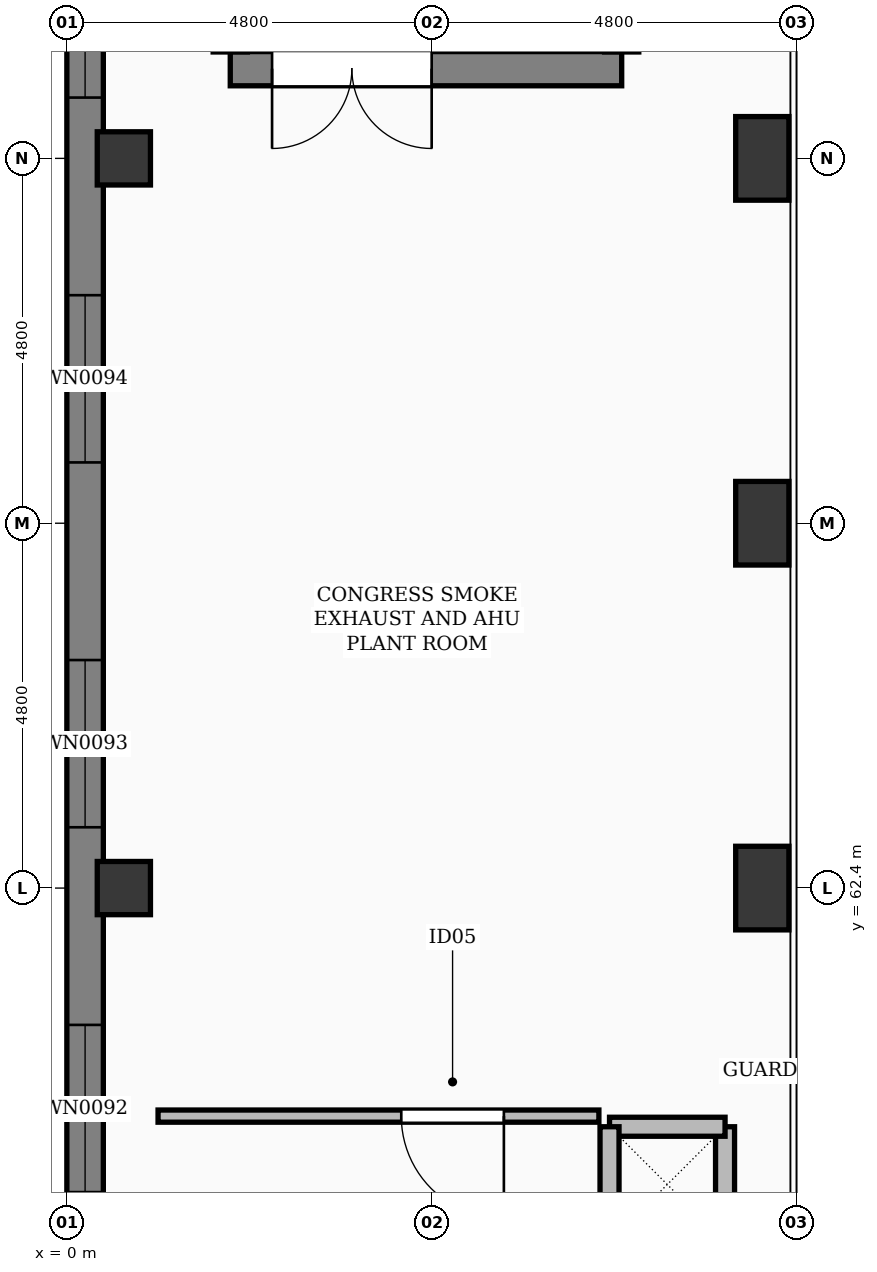
"""IFC4 building model, lengths in metres.
Left out: names, types, materials, properties, quantities, classifications, styles, units other than length and angle.
Written with IfcOpenShell. Run it as: python <this file> out.ifc"""

import sys

from ifc_helpers import new_model, si_unit, direction, frame, frame_2d, origin, origin_2d, place, context, subcontext, project, spatial, rectangle, extrude, element, fill, save


model = new_model("IFC4")
c1 = context("Model", 3, precision=1e-05, world=origin(), true_north=direction((0.0, 1.0)))
c2 = subcontext(c1, "Body", "Model", "MODEL_VIEW")
j1 = project(units=[si_unit("LENGTHUNIT", "METRE"), si_unit("PLANEANGLEUNIT", "RADIAN")], contexts=[c1])
p1 = place(None, origin())
s1 = spatial("IfcSite", under=j1, at=p1, CompositionType="ELEMENT")
p2 = place(p1, origin())
s2 = spatial("IfcBuilding", under=s1, at=p2, CompositionType="ELEMENT")
p3 = place(p2, frame((0.0, 0.0, 16.2)))
s3 = spatial("IfcBuildingStorey", under=s2, at=p3, CompositionType="ELEMENT", Elevation=16.2)
for number, where, z_axis, x_axis in (
    (1, (0.75, 62.4, 0.0), (0.0, 0.0, 1.0), (1.0, 0.0, 0.0)),
    (2, (0.75, 72.0, 0.0), (0.0, 0.0, 1.0), (1.0, 0.0, 0.0)),
):
    element("IfcColumn", number, at=place(p3, frame(where, z_axis=z_axis, x_axis=x_axis)), inside=s3, PredefinedType="COLUMN", context=c2, shape_type="SweptSolid", body=[
        extrude(rectangle(XDim=0.7, YDim=0.7, at=origin_2d()), origin(), (0.0, 0.0, 1.0), 4.8),
    ])
for number, where, z_axis, x_axis in (
    (3, (9.15, 62.4, 0.0), (0.0, 0.0, 1.0), (1.0, 0.0, 0.0)),
    (4, (9.15, 67.2, 0.0), (0.0, 0.0, 1.0), (1.0, 0.0, 0.0)),
    (5, (9.15, 72.0, 0.0), (0.0, 0.0, 1.0), (1.0, 0.0, 0.0)),
):
    element("IfcColumn", number, at=place(p3, frame(where, z_axis=z_axis, x_axis=x_axis)), inside=s3, PredefinedType="COLUMN", context=c2, shape_type="SweptSolid", body=[
        extrude(rectangle(XDim=0.7, YDim=1.1, at=origin_2d()), origin(), (0.0, 0.0, 1.0), 3.0),
    ])
p4 = place(p3, frame((0.24, 33.6, 0.0), z_axis=(0.0, 0.0, 1.0), x_axis=(0.0, 1.0, 0.0)))
e6 = element("IfcWall", 6, at=p4, inside=s3, PredefinedType="SOLIDWALL", context=c2, shape_type="SweptSolid", body=[
    extrude(rectangle(XDim=52.6, YDim=0.48, at=frame_2d((26.3, 0.0))), origin(), (0.0, 0.0, 1.0), 3.0),
])
p5 = place(p4, frame((5.6, 0.0, 0.85)))
e7 = element("IfcOpeningElement", 7, at=p5, cuts=e6, PredefinedType="OPENING", context=c2, shape_type="SweptSolid", body=[
    extrude(rectangle(XDim=2.2, YDim=1.6, at=frame_2d((1.1, 0.8))), frame((0.0, 0.252, 0.0), z_axis=(0.0, -1.0, 0.0), x_axis=(1.0, 0.0, 0.0)), (0.0, 0.0, 1.0), 0.504),
])
p6 = place(p4, frame((10.4, 0.0, 0.85)))
e8 = element("IfcOpeningElement", 8, at=p6, cuts=e6, PredefinedType="OPENING", context=c2, shape_type="SweptSolid", body=[
    extrude(rectangle(XDim=2.2, YDim=1.6, at=frame_2d((1.1, 0.8))), frame((0.0, 0.252, 0.0), z_axis=(0.0, -1.0, 0.0), x_axis=(1.0, 0.0, 0.0)), (0.0, 0.0, 1.0), 0.504),
])
p7 = place(p4, frame((15.2, 0.0, 0.85)))
e9 = element("IfcOpeningElement", 9, at=p7, cuts=e6, PredefinedType="OPENING", context=c2, shape_type="SweptSolid", body=[
    extrude(rectangle(XDim=2.2, YDim=1.6, at=frame_2d((1.1, 0.8))), frame((0.0, 0.252, 0.0), z_axis=(0.0, -1.0, 0.0), x_axis=(1.0, 0.0, 0.0)), (0.0, 0.0, 1.0), 0.504),
])
p8 = place(p4, frame((20.0, 0.0, 0.85)))
e10 = element("IfcOpeningElement", 10, at=p8, cuts=e6, PredefinedType="OPENING", context=c2, shape_type="SweptSolid", body=[
    extrude(rectangle(XDim=2.2, YDim=1.6, at=frame_2d((1.1, 0.8))), frame((0.0, 0.252, 0.0), z_axis=(0.0, -1.0, 0.0), x_axis=(1.0, 0.0, 0.0)), (0.0, 0.0, 1.0), 0.504),
])
p9 = place(p4, frame((24.8, 0.0, 0.85)))
e11 = element("IfcOpeningElement", 11, at=p9, cuts=e6, PredefinedType="OPENING", context=c2, shape_type="SweptSolid", body=[
    extrude(rectangle(XDim=2.2, YDim=1.6, at=frame_2d((1.1, 0.8))), frame((0.0, 0.252, 0.0), z_axis=(0.0, -1.0, 0.0), x_axis=(1.0, 0.0, 0.0)), (0.0, 0.0, 1.0), 0.504),
])
p10 = place(p4, frame((29.6, 0.0, 0.85)))
e12 = element("IfcOpeningElement", 12, at=p10, cuts=e6, PredefinedType="OPENING", context=c2, shape_type="SweptSolid", body=[
    extrude(rectangle(XDim=2.2, YDim=1.6, at=frame_2d((1.1, 0.8))), frame((0.0, 0.252, 0.0), z_axis=(0.0, -1.0, 0.0), x_axis=(1.0, 0.0, 0.0)), (0.0, 0.0, 1.0), 0.504),
])
p11 = place(p4, frame((34.4, 0.0, 0.85)))
e13 = element("IfcOpeningElement", 13, at=p11, cuts=e6, PredefinedType="OPENING", context=c2, shape_type="SweptSolid", body=[
    extrude(rectangle(XDim=2.2, YDim=1.6, at=frame_2d((1.1, 0.8))), frame((0.0, 0.252, 0.0), z_axis=(0.0, -1.0, 0.0), x_axis=(1.0, 0.0, 0.0)), (0.0, 0.0, 1.0), 0.504),
])
p12 = place(p4, frame((39.2, 0.0, 0.85)))
e14 = element("IfcOpeningElement", 14, at=p12, cuts=e6, PredefinedType="OPENING", context=c2, shape_type="SweptSolid", body=[
    extrude(rectangle(XDim=2.2, YDim=1.6, at=frame_2d((1.1, 0.8))), frame((0.0, 0.252, 0.0), z_axis=(0.0, -1.0, 0.0), x_axis=(1.0, 0.0, 0.0)), (0.0, 0.0, 1.0), 0.504),
])
p13 = place(p4, frame((44.0, 0.0, 0.85)))
e15 = element("IfcOpeningElement", 15, at=p13, cuts=e6, PredefinedType="OPENING", context=c2, shape_type="SweptSolid", body=[
    extrude(rectangle(XDim=2.2, YDim=1.6, at=frame_2d((1.1, 0.8))), frame((0.0, 0.252, 0.0), z_axis=(0.0, -1.0, 0.0), x_axis=(1.0, 0.0, 0.0)), (0.0, 0.0, 1.0), 0.504),
])
p14 = place(p4, frame((48.8, 0.0, 0.85)))
e16 = element("IfcOpeningElement", 16, at=p14, cuts=e6, PredefinedType="OPENING", context=c2, shape_type="SweptSolid", body=[
    extrude(rectangle(XDim=2.2, YDim=1.6, at=frame_2d((1.1, 0.8))), frame((0.0, 0.252, 0.0), z_axis=(0.0, -1.0, 0.0), x_axis=(1.0, 0.0, 0.0)), (0.0, 0.0, 1.0), 0.504),
])
p15 = place(p3, frame((2.15, 73.18, 0.0), z_axis=(0.0, 0.0, 1.0), x_axis=(1.0, 0.0, 0.0)))
e17 = element("IfcWall", 17, at=p15, inside=s3, PredefinedType="SHEAR", context=c2, shape_type="SweptSolid", body=[
    extrude(rectangle(XDim=5.15, YDim=0.45, at=frame_2d((2.575, 0.0))), origin(), (0.0, 0.0, 1.0), 4.54),
])
p16 = place(p15, frame((0.55, 0.0, 0.0)))
e18 = element("IfcOpeningElement", 18, at=p16, cuts=e17, PredefinedType="OPENING", context=c2, shape_type="SweptSolid", body=[
    extrude(rectangle(XDim=2.1, YDim=2.2, at=frame_2d((1.05, 1.1))), frame((0.0, 0.237, 0.0), z_axis=(0.0, -1.0, 0.0), x_axis=(1.0, 0.0, 0.0)), (0.0, 0.0, 1.0), 0.474),
])
for number, where, z_axis, x_axis in (
    (19, (8.66, 57.74, 0.0), (0.0, 0.0, 1.0), (0.0, 1.0, 0.0)),
    (20, (8.66, 59.26, 0.0), (0.0, 0.0, 1.0), (-1.0, 0.0, 0.0)),
    (21, (7.14, 59.26, 0.0), (0.0, 0.0, 1.0), (0.0, -1.0, 0.0)),
):
    element("IfcWall", number, at=place(p3, frame(where, z_axis=z_axis, x_axis=x_axis)), inside=s3, PredefinedType="SOLIDWALL", context=c2, shape_type="SweptSolid", body=[
        extrude(rectangle(XDim=1.52, YDim=0.25, at=frame_2d((0.76, 0.0))), origin(), (0.0, 0.0, 1.0), 4.54),
    ])
p17 = place(p3, frame((1.2, 59.4, 0.0), z_axis=(0.0, 0.0, 1.0), x_axis=(1.0, 0.0, 0.0)))
e22 = element("IfcWall", 22, at=p17, inside=s3, PredefinedType="PARTITIONING", context=c2, shape_type="SweptSolid", body=[
    extrude(rectangle(XDim=5.8, YDim=0.16, at=frame_2d((2.9, 0.0))), origin(), (0.0, 0.0, 1.0), 4.54),
])
p18 = place(p17, frame((3.2, 0.0, 0.0)))
e23 = element("IfcOpeningElement", 23, at=p18, cuts=e22, PredefinedType="OPENING", context=c2, shape_type="SweptSolid", body=[
    extrude(rectangle(XDim=1.35, YDim=2.2, at=frame_2d((0.675, 1.1))), frame((0.0, 0.092, 0.0), z_axis=(0.0, -1.0, 0.0), x_axis=(1.0, 0.0, 0.0)), (0.0, 0.0, 1.0), 0.184),
])
p19 = place(p9, origin())
e24 = element("IfcWindow", 24, at=p19, inside=s3, PartitioningType="SINGLE_PANEL", PredefinedType="WINDOW", context=c2, shape_type="SweptSolid", body=[
    extrude(rectangle(XDim=2.2, YDim=1.6, at=frame_2d((1.1, 0.8))), frame((0.0, 0.03, 0.0), z_axis=(0.0, -1.0, 0.0), x_axis=(1.0, 0.0, 0.0)), (0.0, 0.0, 1.0), 0.06),
])
fill(e11, e24)
p20 = place(p10, origin())
e25 = element("IfcWindow", 25, at=p20, inside=s3, PartitioningType="SINGLE_PANEL", PredefinedType="WINDOW", context=c2, shape_type="SweptSolid", body=[
    extrude(rectangle(XDim=2.2, YDim=1.6, at=frame_2d((1.1, 0.8))), frame((0.0, 0.03, 0.0), z_axis=(0.0, -1.0, 0.0), x_axis=(1.0, 0.0, 0.0)), (0.0, 0.0, 1.0), 0.06),
])
fill(e12, e25)
p21 = place(p11, origin())
e26 = element("IfcWindow", 26, at=p21, inside=s3, PartitioningType="SINGLE_PANEL", PredefinedType="WINDOW", context=c2, shape_type="SweptSolid", body=[
    extrude(rectangle(XDim=2.2, YDim=1.6, at=frame_2d((1.1, 0.8))), frame((0.0, 0.03, 0.0), z_axis=(0.0, -1.0, 0.0), x_axis=(1.0, 0.0, 0.0)), (0.0, 0.0, 1.0), 0.06),
])
fill(e13, e26)
p22 = place(p12, origin())
e27 = element("IfcWindow", 27, at=p22, inside=s3, PartitioningType="SINGLE_PANEL", PredefinedType="WINDOW", context=c2, shape_type="SweptSolid", body=[
    extrude(rectangle(XDim=2.2, YDim=1.6, at=frame_2d((1.1, 0.8))), frame((0.0, 0.03, 0.0), z_axis=(0.0, -1.0, 0.0), x_axis=(1.0, 0.0, 0.0)), (0.0, 0.0, 1.0), 0.06),
])
fill(e14, e27)
p23 = place(p16, frame((2.1, 0.0, 0.0), z_axis=(0.0, 0.0, 1.0), x_axis=(-1.0, 0.0, 0.0)))
e28 = element("IfcDoor", 28, at=p23, inside=s3, OperationType="DOUBLE_DOOR_SINGLE_SWING", PredefinedType="DOOR", context=c2, shape_type="SweptSolid", body=[
    extrude(rectangle(XDim=2.1, YDim=2.2, at=frame_2d((1.05, 1.1))), frame((0.0, 0.025, 0.0), z_axis=(0.0, -1.0, 0.0), x_axis=(1.0, 0.0, 0.0)), (0.0, 0.0, 1.0), 0.05),
])
fill(e18, e28)
p24 = place(p18, frame((1.35, 0.0, 0.0), z_axis=(0.0, 0.0, 1.0), x_axis=(-1.0, 0.0, 0.0)))
e29 = element("IfcDoor", 29, at=p24, inside=s3, OperationType="SINGLE_SWING_RIGHT", PredefinedType="DOOR", context=c2, shape_type="SweptSolid", body=[
    extrude(rectangle(XDim=1.35, YDim=2.2, at=frame_2d((0.675, 1.1))), frame((0.0, 0.025, 0.0), z_axis=(0.0, -1.0, 0.0), x_axis=(1.0, 0.0, 0.0)), (0.0, 0.0, 1.0), 0.05),
])
fill(e23, e29)
save(model, sys.argv[1])
